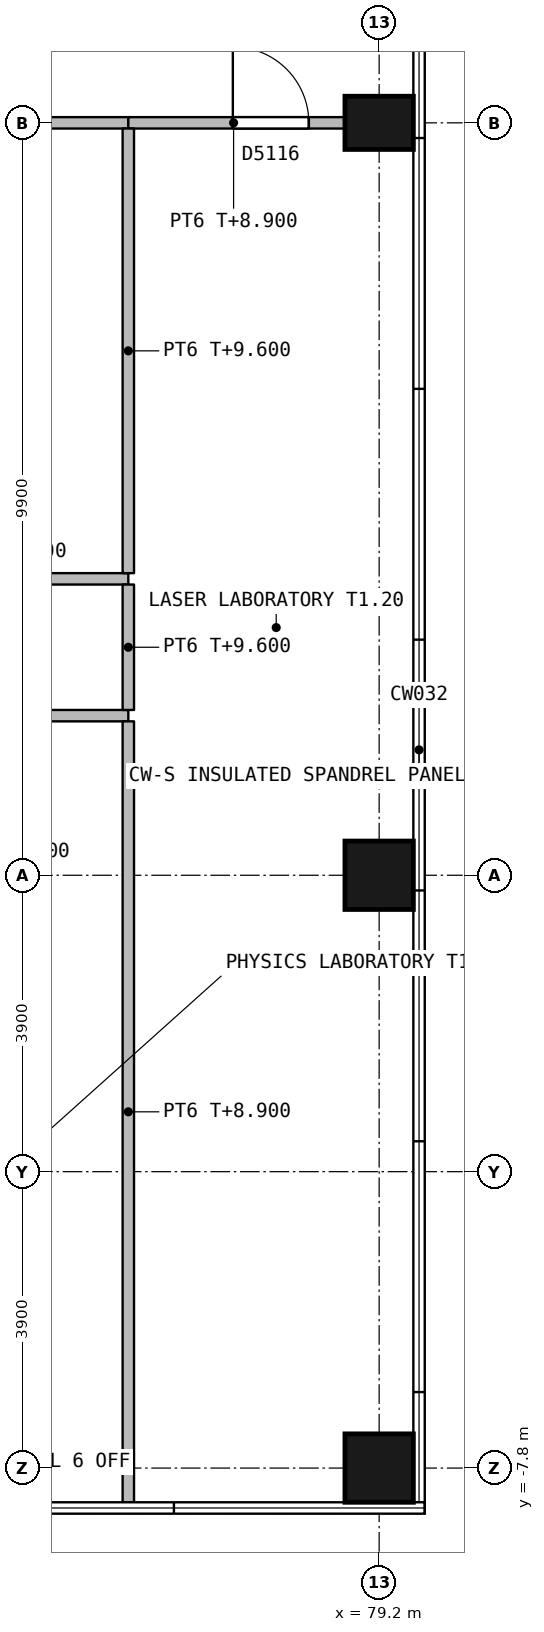
"""IFC4 building model, lengths in metres.
Left out: names, types, materials, properties, quantities, classifications, styles, units other than length and angle.
Written with IfcOpenShell. Run it as: python <this file> out.ifc"""

import sys

from ifc_helpers import new_model, si_unit, direction, frame, frame_2d, origin, origin_2d, place, context, subcontext, project, spatial, rectangle, extrude, element, fill, save


model = new_model("IFC4")
c1 = context("Model", 3, precision=1e-05, world=origin(), true_north=direction((0.0, 1.0)))
c2 = subcontext(c1, "Body", "Model", "MODEL_VIEW")
j1 = project(units=[si_unit("LENGTHUNIT", "METRE"), si_unit("PLANEANGLEUNIT", "RADIAN")], contexts=[c1])
p1 = place(None, origin())
s1 = spatial("IfcSite", under=j1, at=p1, CompositionType="ELEMENT")
p2 = place(p1, origin())
s2 = spatial("IfcBuilding", under=s1, at=p2, CompositionType="ELEMENT")
p3 = place(p2, frame((0.0, 0.0, 5.4)))
s3 = spatial("IfcBuildingStorey", under=s2, at=p3, CompositionType="ELEMENT", Elevation=5.4)
for number, where, z_axis, x_axis in (
    (1, (79.2, -7.8, 0.0), (0.0, 0.0, 1.0), (1.0, 0.0, 0.0)),
    (2, (79.2, 0.0, 0.0), (0.0, 0.0, 1.0), (1.0, 0.0, 0.0)),
):
    element("IfcColumn", number, at=place(p3, frame(where, z_axis=z_axis, x_axis=x_axis)), inside=s3, PredefinedType="COLUMN", context=c2, shape_type="SweptSolid", body=[
        extrude(rectangle(XDim=0.9, YDim=0.9, at=origin_2d()), origin(), (0.0, 0.0, 1.0), 4.5),
    ])
p4 = place(p3, frame((79.2, 9.9, 0.0), z_axis=(0.0, 0.0, 1.0), x_axis=(1.0, 0.0, 0.0)))
e3 = element("IfcColumn", 3, at=p4, inside=s3, PredefinedType="COLUMN", context=c2, shape_type="SweptSolid", body=[
    extrude(rectangle(XDim=0.9, YDim=0.7, at=origin_2d()), origin(), (0.0, 0.0, 1.0), 4.5),
])
p5 = place(p3, frame((73.05, 9.9, 0.0), z_axis=(0.0, 0.0, 1.0), x_axis=(1.0, 0.0, 0.0)))
e4 = element("IfcWall", 4, at=p5, inside=s3, PredefinedType="PARTITIONING", context=c2, shape_type="SweptSolid", body=[
    extrude(rectangle(XDim=2.85, YDim=0.15, at=frame_2d((1.425, 0.0))), origin(), (0.0, 0.0, 1.0), 3.5),
])
p6 = place(p5, frame((0.7, 0.0, 0.0)))
e5 = element("IfcOpeningElement", 5, at=p6, cuts=e4, PredefinedType="OPENING", context=c2, shape_type="SweptSolid", body=[
    extrude(rectangle(XDim=1.0, YDim=2.1, at=frame_2d((0.5, 1.05))), frame((0.0, 0.085, 0.0), z_axis=(0.0, -1.0, 0.0), x_axis=(1.0, 0.0, 0.0)), (0.0, 0.0, 1.0), 0.17),
])
p7 = place(p3, frame((75.9, 9.9, 0.0), z_axis=(0.0, 0.0, 1.0), x_axis=(1.0, 0.0, 0.0)))
e6 = element("IfcWall", 6, at=p7, inside=s3, PredefinedType="PARTITIONING", context=c2, shape_type="SweptSolid", body=[
    extrude(rectangle(XDim=2.85, YDim=0.15, at=frame_2d((1.425, 0.0))), origin(), (0.0, 0.0, 1.0), 3.5),
])
p8 = place(p7, frame((1.375, 0.0, 0.0)))
e7 = element("IfcOpeningElement", 7, at=p8, cuts=e6, PredefinedType="OPENING", context=c2, shape_type="SweptSolid", body=[
    extrude(rectangle(XDim=1.0, YDim=2.1, at=frame_2d((0.5, 1.05))), frame((0.0, 0.085, 0.0), z_axis=(0.0, -1.0, 0.0), x_axis=(1.0, 0.0, 0.0)), (0.0, 0.0, 1.0), 0.17),
])
p9 = place(p3, frame((75.9, 2.1, 0.0), z_axis=(0.0, 0.0, 1.0), x_axis=(-1.0, 0.0, 0.0)))
e8 = element("IfcWall", 8, at=p9, inside=s3, PredefinedType="PARTITIONING", context=c2, shape_type="SweptSolid", body=[
    extrude(rectangle(XDim=3.225, YDim=0.15, at=frame_2d((1.612, 0.0))), origin(), (0.0, 0.0, 1.0), 4.2),
])
p10 = place(p9, frame((1.15, 0.0, 0.0)))
e9 = element("IfcOpeningElement", 9, at=p10, cuts=e8, PredefinedType="OPENING", context=c2, shape_type="SweptSolid", body=[
    extrude(rectangle(XDim=1.0, YDim=2.1, at=frame_2d((0.5, 1.05))), frame((0.0, 0.085, 0.0), z_axis=(0.0, -1.0, 0.0), x_axis=(1.0, 0.0, 0.0)), (0.0, 0.0, 1.0), 0.17),
])
p11 = place(p3, frame((75.9, -8.25, 0.0), z_axis=(0.0, 0.0, 1.0), x_axis=(0.0, 1.0, 0.0)))
e10 = element("IfcWall", 10, at=p11, inside=s3, PredefinedType="PARTITIONING", context=c2, shape_type="SweptSolid", body=[
    extrude(rectangle(XDim=10.275, YDim=0.15, at=frame_2d((5.137, 0.0))), origin(), (0.0, 0.0, 1.0), 3.5),
])
p12 = place(p3, frame((75.9, 3.9, 0.0), z_axis=(0.0, 0.0, 1.0), x_axis=(-1.0, 0.0, 0.0)))
e11 = element("IfcWall", 11, at=p12, inside=s3, PredefinedType="PARTITIONING", context=c2, shape_type="SweptSolid", body=[
    extrude(rectangle(XDim=3.3, YDim=0.15, at=frame_2d((1.65, 0.0))), origin(), (0.0, 0.0, 1.0), 4.2),
])
p13 = place(p3, frame((75.9, 2.175, 0.0), z_axis=(0.0, 0.0, 1.0), x_axis=(0.0, 1.0, 0.0)))
e12 = element("IfcWall", 12, at=p13, inside=s3, PredefinedType="PARTITIONING", context=c2, shape_type="SweptSolid", body=[
    extrude(rectangle(XDim=1.65, YDim=0.15, at=frame_2d((0.825, 0.0))), origin(), (0.0, 0.0, 1.0), 4.2),
])
p14 = place(p3, frame((75.9, 3.975, 0.0), z_axis=(0.0, 0.0, 1.0), x_axis=(0.0, 1.0, 0.0)))
e13 = element("IfcWall", 13, at=p14, inside=s3, PredefinedType="PARTITIONING", context=c2, shape_type="SweptSolid", body=[
    extrude(rectangle(XDim=5.85, YDim=0.15, at=frame_2d((2.925, 0.0))), origin(), (0.0, 0.0, 1.0), 4.2),
])
p15 = place(p8, origin())
e14 = element("IfcDoor", 14, at=p15, inside=s3, OperationType="SINGLE_SWING_LEFT", PredefinedType="DOOR", context=c2, shape_type="SweptSolid", body=[
    extrude(rectangle(XDim=1.0, YDim=2.1, at=frame_2d((0.5, 1.05))), frame((0.0, 0.027, 0.0), z_axis=(0.0, -1.0, 0.0), x_axis=(1.0, 0.0, 0.0)), (0.0, 0.0, 1.0), 0.054),
])
fill(e7, e14)
save(model, sys.argv[1])
